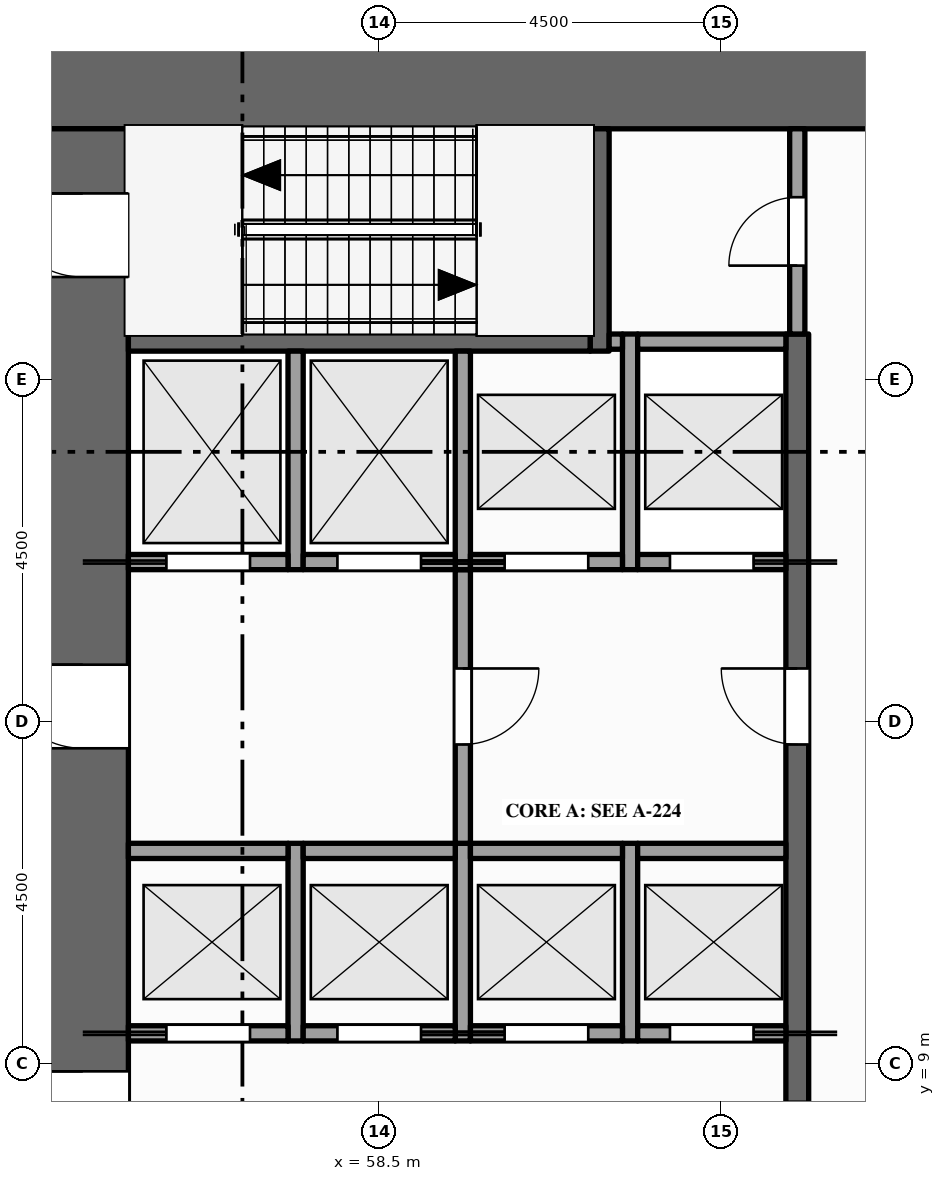
"""IFC4 building model, lengths in metres.
Left out: names, types, materials, properties, quantities, classifications, styles, units other than length and angle.
Written with IfcOpenShell. Run it as: python <this file> out.ifc"""

import sys

from ifc_helpers import new_model, si_unit, direction, frame, frame_2d, origin, place, context, subcontext, project, spatial, rectangle, extrude, element, fill, save


model = new_model("IFC4")
c1 = context("Model", 3, precision=1e-05, world=origin(), true_north=direction((0.0, 1.0)))
c2 = subcontext(c1, "Body", "Model", "MODEL_VIEW")
j1 = project(units=[si_unit("LENGTHUNIT", "METRE"), si_unit("PLANEANGLEUNIT", "RADIAN")], contexts=[c1])
p1 = place(None, origin())
s1 = spatial("IfcSite", under=j1, at=p1, CompositionType="ELEMENT")
p2 = place(p1, origin())
s2 = spatial("IfcBuilding", under=s1, at=p2, CompositionType="ELEMENT")
p3 = place(p2, frame((0.0, 0.0, 131.0)))
s3 = spatial("IfcBuildingStorey", under=s2, at=p3, CompositionType="ELEMENT", Elevation=131.0)
p4 = place(p3, frame((54.0, 21.9, -0.15), z_axis=(0.0, 0.0, 1.0), x_axis=(1.0, 0.0, 0.0)))
e1 = element("IfcWall", 1, at=p4, inside=s3, PredefinedType="SHEAR", context=c2, shape_type="SweptSolid", body=[
    extrude(rectangle(XDim=13.5, YDim=1.2, at=frame_2d((6.75, 0.0))), origin(), (0.0, 0.0, 1.0), 8.0),
])
p5 = place(p3, frame((54.6, 1.2, -0.15), z_axis=(0.0, 0.0, 1.0), x_axis=(0.0, 1.0, 0.0)))
e2 = element("IfcWall", 2, at=p5, inside=s3, PredefinedType="SHEAR", context=c2, shape_type="SweptSolid", body=[
    extrude(rectangle(XDim=20.1, YDim=1.2, at=frame_2d((10.05, 0.0))), origin(), (0.0, 0.0, 1.0), 8.0),
])
p6 = place(p5, frame((5.9, 0.0, 0.15)))
e3 = element("IfcOpeningElement", 3, at=p6, cuts=e2, PredefinedType="OPENING", context=c2, shape_type="SweptSolid", body=[
    extrude(rectangle(XDim=1.8, YDim=2.1, at=frame_2d((0.9, 1.05))), frame((0.0, 0.61, 0.0), z_axis=(0.0, -1.0, 0.0), x_axis=(1.0, 0.0, 0.0)), (0.0, 0.0, 1.0), 1.22),
])
p7 = place(p5, frame((11.95, 0.0, 0.15)))
e4 = element("IfcOpeningElement", 4, at=p7, cuts=e2, PredefinedType="OPENING", context=c2, shape_type="SweptSolid", body=[
    extrude(rectangle(XDim=1.1, YDim=2.1, at=frame_2d((0.55, 1.05))), frame((0.0, 0.61, 0.0), z_axis=(0.0, -1.0, 0.0), x_axis=(1.0, 0.0, 0.0)), (0.0, 0.0, 1.0), 1.22),
])
p8 = place(p5, frame((0.95, 0.0, 0.15)))
e5 = element("IfcOpeningElement", 5, at=p8, cuts=e2, PredefinedType="OPENING", context=c2, shape_type="SweptSolid", body=[
    extrude(rectangle(XDim=1.1, YDim=2.1, at=frame_2d((0.55, 1.05))), frame((0.0, 0.61, 0.0), z_axis=(0.0, -1.0, 0.0), x_axis=(1.0, 0.0, 0.0)), (0.0, 0.0, 1.0), 1.22),
])
p9 = place(p5, frame((18.15, 0.0, 0.15)))
e6 = element("IfcOpeningElement", 6, at=p9, cuts=e2, PredefinedType="OPENING", context=c2, shape_type="SweptSolid", body=[
    extrude(rectangle(XDim=1.1, YDim=2.1, at=frame_2d((0.55, 1.05))), frame((0.0, 0.61, 0.0), z_axis=(0.0, -1.0, 0.0), x_axis=(1.0, 0.0, 0.0)), (0.0, 0.0, 1.0), 1.22),
])
p10 = place(p3, frame((57.4, 9.3, 0.0), z_axis=(0.0, 0.0, 1.0), x_axis=(0.0, 1.0, 0.0)))
e7 = element("IfcWall", 7, at=p10, inside=s3, PredefinedType="SOLIDWALL", context=c2, shape_type="SweptSolid", body=[
    extrude(rectangle(XDim=2.6, YDim=0.2, at=frame_2d((1.3, 0.0))), origin(), (0.0, 0.0, 1.0), 7.85),
])
p11 = place(p3, frame((57.4, 15.5, 0.0), z_axis=(0.0, 0.0, 1.0), x_axis=(0.0, 1.0, 0.0)))
e8 = element("IfcWall", 8, at=p11, inside=s3, PredefinedType="SOLIDWALL", context=c2, shape_type="SweptSolid", body=[
    extrude(rectangle(XDim=2.875, YDim=0.2, at=frame_2d((1.438, 0.0))), origin(), (0.0, 0.0, 1.0), 7.85),
])
p12 = place(p3, frame((59.6, 9.3, 0.0), z_axis=(0.0, 0.0, 1.0), x_axis=(0.0, 1.0, 0.0)))
e9 = element("IfcWall", 9, at=p12, inside=s3, PredefinedType="SOLIDWALL", context=c2, shape_type="SweptSolid", body=[
    extrude(rectangle(XDim=2.6, YDim=0.2, at=frame_2d((1.3, 0.0))), origin(), (0.0, 0.0, 1.0), 7.85),
])
p13 = place(p3, frame((59.6, 11.9, 0.0), z_axis=(0.0, 0.0, 1.0), x_axis=(0.0, 1.0, 0.0)))
e10 = element("IfcWall", 10, at=p13, inside=s3, PredefinedType="PARTITIONING", context=c2, shape_type="SweptSolid", body=[
    extrude(rectangle(XDim=3.6, YDim=0.2, at=frame_2d((1.8, 0.0))), origin(), (0.0, 0.0, 1.0), 7.85),
])
p14 = place(p13, frame((1.3, 0.0, 0.0)))
e11 = element("IfcOpeningElement", 11, at=p14, cuts=e10, PredefinedType="OPENING", context=c2, shape_type="SweptSolid", body=[
    extrude(rectangle(XDim=1.0, YDim=2.1, at=frame_2d((0.5, 1.05))), frame((0.0, 0.11, 0.0), z_axis=(0.0, -1.0, 0.0), x_axis=(1.0, 0.0, 0.0)), (0.0, 0.0, 1.0), 0.22),
])
p15 = place(p3, frame((59.6, 15.5, 0.0), z_axis=(0.0, 0.0, 1.0), x_axis=(0.0, 1.0, 0.0)))
e12 = element("IfcWall", 12, at=p15, inside=s3, PredefinedType="SOLIDWALL", context=c2, shape_type="SweptSolid", body=[
    extrude(rectangle(XDim=2.875, YDim=0.2, at=frame_2d((1.438, 0.0))), origin(), (0.0, 0.0, 1.0), 7.85),
])
p16 = place(p3, frame((61.4, 18.375, 0.0), z_axis=(0.0, 0.0, 1.0), x_axis=(0.0, 1.0, 0.0)))
e13 = element("IfcWall", 13, at=p16, inside=s3, PredefinedType="SHEAR", context=c2, shape_type="SweptSolid", body=[
    extrude(rectangle(XDim=2.925, YDim=0.25, at=frame_2d((1.462, 0.0))), origin(), (0.0, 0.0, 1.0), 7.85),
])
p17 = place(p3, frame((61.8, 9.3, 0.0), z_axis=(0.0, 0.0, 1.0), x_axis=(0.0, 1.0, 0.0)))
e14 = element("IfcWall", 14, at=p17, inside=s3, PredefinedType="SOLIDWALL", context=c2, shape_type="SweptSolid", body=[
    extrude(rectangle(XDim=2.6, YDim=0.2, at=frame_2d((1.3, 0.0))), origin(), (0.0, 0.0, 1.0), 7.85),
])
p18 = place(p3, frame((61.8, 15.5, 0.0), z_axis=(0.0, 0.0, 1.0), x_axis=(0.0, 1.0, 0.0)))
e15 = element("IfcWall", 15, at=p18, inside=s3, PredefinedType="SOLIDWALL", context=c2, shape_type="SweptSolid", body=[
    extrude(rectangle(XDim=3.1, YDim=0.2, at=frame_2d((1.55, 0.0))), origin(), (0.0, 0.0, 1.0), 7.85),
])
p19 = place(p3, frame((64.0, 4.1, 0.0), z_axis=(0.0, 0.0, 1.0), x_axis=(0.0, 1.0, 0.0)))
e16 = element("IfcWall", 16, at=p19, inside=s3, PredefinedType="SHEAR", context=c2, shape_type="SweptSolid", body=[
    extrude(rectangle(XDim=14.5, YDim=0.3, at=frame_2d((7.25, 0.0))), origin(), (0.0, 0.0, 1.0), 7.85),
])
p20 = place(p19, frame((3.4, 0.0, 0.0)))
e17 = element("IfcOpeningElement", 17, at=p20, cuts=e16, PredefinedType="OPENING", context=c2, shape_type="SweptSolid", body=[
    extrude(rectangle(XDim=1.0, YDim=2.1, at=frame_2d((0.5, 1.05))), frame((0.0, 0.16, 0.0), z_axis=(0.0, -1.0, 0.0), x_axis=(1.0, 0.0, 0.0)), (0.0, 0.0, 1.0), 0.32),
])
p21 = place(p19, frame((9.1, 0.0, 0.0)))
e18 = element("IfcOpeningElement", 18, at=p21, cuts=e16, PredefinedType="OPENING", context=c2, shape_type="SweptSolid", body=[
    extrude(rectangle(XDim=1.0, YDim=2.1, at=frame_2d((0.5, 1.05))), frame((0.0, 0.16, 0.0), z_axis=(0.0, -1.0, 0.0), x_axis=(1.0, 0.0, 0.0)), (0.0, 0.0, 1.0), 0.32),
])
p22 = place(p3, frame((64.0, 18.6, 0.0), z_axis=(0.0, 0.0, 1.0), x_axis=(0.0, 1.0, 0.0)))
e19 = element("IfcWall", 19, at=p22, inside=s3, PredefinedType="PARTITIONING", context=c2, shape_type="SweptSolid", body=[
    extrude(rectangle(XDim=2.7, YDim=0.2, at=frame_2d((1.35, 0.0))), origin(), (0.0, 0.0, 1.0), 7.85),
])
p23 = place(p22, frame((0.9, 0.0, 0.0)))
e20 = element("IfcOpeningElement", 20, at=p23, cuts=e19, PredefinedType="OPENING", context=c2, shape_type="SweptSolid", body=[
    extrude(rectangle(XDim=0.9, YDim=2.1, at=frame_2d((0.45, 1.05))), frame((0.0, 0.11, 0.0), z_axis=(0.0, -1.0, 0.0), x_axis=(1.0, 0.0, 0.0)), (0.0, 0.0, 1.0), 0.22),
])
p24 = place(p3, frame((55.2, 9.4, 0.0), z_axis=(0.0, 0.0, 1.0), x_axis=(1.0, 0.0, 0.0)))
e21 = element("IfcWall", 21, at=p24, inside=s3, PredefinedType="SOLIDWALL", context=c2, shape_type="SweptSolid", body=[
    extrude(rectangle(XDim=2.1, YDim=0.2, at=frame_2d((1.05, 0.0))), origin(), (0.0, 0.0, 1.0), 7.85),
])
p25 = place(p24, frame((0.5, 0.0, 0.012)))
e22 = element("IfcOpeningElement", 22, at=p25, cuts=e21, PredefinedType="OPENING", context=c2, shape_type="SweptSolid", body=[
    extrude(rectangle(XDim=1.1, YDim=2.1, at=frame_2d((0.55, 1.05))), frame((0.0, 0.11, 0.0), z_axis=(0.0, -1.0, 0.0), x_axis=(1.0, 0.0, 0.0)), (0.0, 0.0, 1.0), 0.22),
])
p26 = place(p3, frame((57.5, 9.4, 0.0), z_axis=(0.0, 0.0, 1.0), x_axis=(1.0, 0.0, 0.0)))
e23 = element("IfcWall", 23, at=p26, inside=s3, PredefinedType="SOLIDWALL", context=c2, shape_type="SweptSolid", body=[
    extrude(rectangle(XDim=2.0, YDim=0.2, at=frame_2d((1.0, 0.0))), origin(), (0.0, 0.0, 1.0), 7.85),
])
p27 = place(p26, frame((0.45, 0.0, 0.012)))
e24 = element("IfcOpeningElement", 24, at=p27, cuts=e23, PredefinedType="OPENING", context=c2, shape_type="SweptSolid", body=[
    extrude(rectangle(XDim=1.1, YDim=2.1, at=frame_2d((0.55, 1.05))), frame((0.0, 0.11, 0.0), z_axis=(0.0, -1.0, 0.0), x_axis=(1.0, 0.0, 0.0)), (0.0, 0.0, 1.0), 0.22),
])
p28 = place(p3, frame((59.7, 9.4, 0.0), z_axis=(0.0, 0.0, 1.0), x_axis=(1.0, 0.0, 0.0)))
e25 = element("IfcWall", 25, at=p28, inside=s3, PredefinedType="SOLIDWALL", context=c2, shape_type="SweptSolid", body=[
    extrude(rectangle(XDim=2.0, YDim=0.2, at=frame_2d((1.0, 0.0))), origin(), (0.0, 0.0, 1.0), 7.85),
])
p29 = place(p28, frame((0.45, 0.0, 0.012)))
e26 = element("IfcOpeningElement", 26, at=p29, cuts=e25, PredefinedType="OPENING", context=c2, shape_type="SweptSolid", body=[
    extrude(rectangle(XDim=1.1, YDim=2.1, at=frame_2d((0.55, 1.05))), frame((0.0, 0.11, 0.0), z_axis=(0.0, -1.0, 0.0), x_axis=(1.0, 0.0, 0.0)), (0.0, 0.0, 1.0), 0.22),
])
p30 = place(p3, frame((61.9, 9.4, 0.0), z_axis=(0.0, 0.0, 1.0), x_axis=(1.0, 0.0, 0.0)))
e27 = element("IfcWall", 27, at=p30, inside=s3, PredefinedType="SOLIDWALL", context=c2, shape_type="SweptSolid", body=[
    extrude(rectangle(XDim=1.95, YDim=0.2, at=frame_2d((0.975, 0.0))), origin(), (0.0, 0.0, 1.0), 7.85),
])
p31 = place(p30, frame((0.425, 0.0, 0.012)))
e28 = element("IfcOpeningElement", 28, at=p31, cuts=e27, PredefinedType="OPENING", context=c2, shape_type="SweptSolid", body=[
    extrude(rectangle(XDim=1.1, YDim=2.1, at=frame_2d((0.55, 1.05))), frame((0.0, 0.11, 0.0), z_axis=(0.0, -1.0, 0.0), x_axis=(1.0, 0.0, 0.0)), (0.0, 0.0, 1.0), 0.22),
])
p32 = place(p3, frame((55.2, 11.8, 0.0), z_axis=(0.0, 0.0, 1.0), x_axis=(1.0, 0.0, 0.0)))
e29 = element("IfcWall", 29, at=p32, inside=s3, PredefinedType="SOLIDWALL", context=c2, shape_type="SweptSolid", body=[
    extrude(rectangle(XDim=2.1, YDim=0.2, at=frame_2d((1.05, 0.0))), origin(), (0.0, 0.0, 1.0), 7.85),
])
for number, where, z_axis, x_axis in (
    (30, (57.5, 11.8, 0.0), (0.0, 0.0, 1.0), (1.0, 0.0, 0.0)),
    (31, (59.7, 11.8, 0.0), (0.0, 0.0, 1.0), (1.0, 0.0, 0.0)),
):
    element("IfcWall", number, at=place(p3, frame(where, z_axis=z_axis, x_axis=x_axis)), inside=s3, PredefinedType="SOLIDWALL", context=c2, shape_type="SweptSolid", body=[
        extrude(rectangle(XDim=2.0, YDim=0.2, at=frame_2d((1.0, 0.0))), origin(), (0.0, 0.0, 1.0), 7.85),
    ])
p33 = place(p3, frame((61.9, 11.8, 0.0), z_axis=(0.0, 0.0, 1.0), x_axis=(1.0, 0.0, 0.0)))
e32 = element("IfcWall", 32, at=p33, inside=s3, PredefinedType="SOLIDWALL", context=c2, shape_type="SweptSolid", body=[
    extrude(rectangle(XDim=1.95, YDim=0.2, at=frame_2d((0.975, 0.0))), origin(), (0.0, 0.0, 1.0), 7.85),
])
p34 = place(p3, frame((55.2, 15.6, 0.0), z_axis=(0.0, 0.0, 1.0), x_axis=(1.0, 0.0, 0.0)))
e33 = element("IfcWall", 33, at=p34, inside=s3, PredefinedType="SOLIDWALL", context=c2, shape_type="SweptSolid", body=[
    extrude(rectangle(XDim=2.1, YDim=0.2, at=frame_2d((1.05, 0.0))), origin(), (0.0, 0.0, 1.0), 7.85),
])
p35 = place(p34, frame((0.5, 0.0, 0.012)))
e34 = element("IfcOpeningElement", 34, at=p35, cuts=e33, PredefinedType="OPENING", context=c2, shape_type="SweptSolid", body=[
    extrude(rectangle(XDim=1.1, YDim=2.1, at=frame_2d((0.55, 1.05))), frame((0.0, 0.11, 0.0), z_axis=(0.0, -1.0, 0.0), x_axis=(1.0, 0.0, 0.0)), (0.0, 0.0, 1.0), 0.22),
])
p36 = place(p3, frame((57.5, 15.6, 0.0), z_axis=(0.0, 0.0, 1.0), x_axis=(1.0, 0.0, 0.0)))
e35 = element("IfcWall", 35, at=p36, inside=s3, PredefinedType="SOLIDWALL", context=c2, shape_type="SweptSolid", body=[
    extrude(rectangle(XDim=2.0, YDim=0.2, at=frame_2d((1.0, 0.0))), origin(), (0.0, 0.0, 1.0), 7.85),
])
p37 = place(p36, frame((0.45, 0.0, 0.012)))
e36 = element("IfcOpeningElement", 36, at=p37, cuts=e35, PredefinedType="OPENING", context=c2, shape_type="SweptSolid", body=[
    extrude(rectangle(XDim=1.1, YDim=2.1, at=frame_2d((0.55, 1.05))), frame((0.0, 0.11, 0.0), z_axis=(0.0, -1.0, 0.0), x_axis=(1.0, 0.0, 0.0)), (0.0, 0.0, 1.0), 0.22),
])
p38 = place(p3, frame((59.7, 15.6, 0.0), z_axis=(0.0, 0.0, 1.0), x_axis=(1.0, 0.0, 0.0)))
e37 = element("IfcWall", 37, at=p38, inside=s3, PredefinedType="SOLIDWALL", context=c2, shape_type="SweptSolid", body=[
    extrude(rectangle(XDim=2.0, YDim=0.2, at=frame_2d((1.0, 0.0))), origin(), (0.0, 0.0, 1.0), 7.85),
])
p39 = place(p38, frame((0.45, 0.0, 0.012)))
e38 = element("IfcOpeningElement", 38, at=p39, cuts=e37, PredefinedType="OPENING", context=c2, shape_type="SweptSolid", body=[
    extrude(rectangle(XDim=1.1, YDim=2.1, at=frame_2d((0.55, 1.05))), frame((0.0, 0.11, 0.0), z_axis=(0.0, -1.0, 0.0), x_axis=(1.0, 0.0, 0.0)), (0.0, 0.0, 1.0), 0.22),
])
p40 = place(p3, frame((61.9, 15.6, 0.0), z_axis=(0.0, 0.0, 1.0), x_axis=(1.0, 0.0, 0.0)))
e39 = element("IfcWall", 39, at=p40, inside=s3, PredefinedType="SOLIDWALL", context=c2, shape_type="SweptSolid", body=[
    extrude(rectangle(XDim=1.95, YDim=0.2, at=frame_2d((0.975, 0.0))), origin(), (0.0, 0.0, 1.0), 7.85),
])
p41 = place(p40, frame((0.425, 0.0, 0.012)))
e40 = element("IfcOpeningElement", 40, at=p41, cuts=e39, PredefinedType="OPENING", context=c2, shape_type="SweptSolid", body=[
    extrude(rectangle(XDim=1.1, YDim=2.1, at=frame_2d((0.55, 1.05))), frame((0.0, 0.11, 0.0), z_axis=(0.0, -1.0, 0.0), x_axis=(1.0, 0.0, 0.0)), (0.0, 0.0, 1.0), 0.22),
])
p42 = place(p3, frame((55.2, 18.5, 0.0), z_axis=(0.0, 0.0, 1.0), x_axis=(1.0, 0.0, 0.0)))
e41 = element("IfcWall", 41, at=p42, inside=s3, PredefinedType="SHEAR", context=c2, shape_type="SweptSolid", body=[
    extrude(rectangle(XDim=6.075, YDim=0.25, at=frame_2d((3.038, 0.0))), origin(), (0.0, 0.0, 1.0), 7.85),
])
p43 = place(p3, frame((61.525, 18.5, 0.0), z_axis=(0.0, 0.0, 1.0), x_axis=(1.0, 0.0, 0.0)))
e42 = element("IfcWall", 42, at=p43, inside=s3, PredefinedType="SOLIDWALL", context=c2, shape_type="SweptSolid", body=[
    extrude(rectangle(XDim=0.175, YDim=0.2, at=frame_2d((0.087, 0.0))), origin(), (0.0, 0.0, 1.0), 7.85),
])
p44 = place(p3, frame((61.9, 18.5, 0.0), z_axis=(0.0, 0.0, 1.0), x_axis=(1.0, 0.0, 0.0)))
e43 = element("IfcWall", 43, at=p44, inside=s3, PredefinedType="SOLIDWALL", context=c2, shape_type="SweptSolid", body=[
    extrude(rectangle(XDim=1.95, YDim=0.2, at=frame_2d((0.975, 0.0))), origin(), (0.0, 0.0, 1.0), 7.85),
])
p45 = place(p25, origin())
e44 = element("IfcDoor", 44, at=p45, inside=s3, OperationType="SLIDING_TO_LEFT", PredefinedType="DOOR", context=c2, shape_type="SweptSolid", body=[
    extrude(rectangle(XDim=1.1, YDim=2.1, at=frame_2d((0.55, 1.05))), frame((0.0, 0.025, 0.0), z_axis=(0.0, -1.0, 0.0), x_axis=(1.0, 0.0, 0.0)), (0.0, 0.0, 1.0), 0.05),
])
fill(e22, e44)
p46 = place(p27, origin())
e45 = element("IfcDoor", 45, at=p46, inside=s3, OperationType="SLIDING_TO_RIGHT", PredefinedType="DOOR", context=c2, shape_type="SweptSolid", body=[
    extrude(rectangle(XDim=1.1, YDim=2.1, at=frame_2d((0.55, 1.05))), frame((0.0, 0.025, 0.0), z_axis=(0.0, -1.0, 0.0), x_axis=(1.0, 0.0, 0.0)), (0.0, 0.0, 1.0), 0.05),
])
fill(e24, e45)
p47 = place(p29, origin())
e46 = element("IfcDoor", 46, at=p47, inside=s3, OperationType="SLIDING_TO_LEFT", PredefinedType="DOOR", context=c2, shape_type="SweptSolid", body=[
    extrude(rectangle(XDim=1.1, YDim=2.1, at=frame_2d((0.55, 1.05))), frame((0.0, 0.025, 0.0), z_axis=(0.0, -1.0, 0.0), x_axis=(1.0, 0.0, 0.0)), (0.0, 0.0, 1.0), 0.05),
])
fill(e26, e46)
p48 = place(p31, origin())
e47 = element("IfcDoor", 47, at=p48, inside=s3, OperationType="SLIDING_TO_RIGHT", PredefinedType="DOOR", context=c2, shape_type="SweptSolid", body=[
    extrude(rectangle(XDim=1.1, YDim=2.1, at=frame_2d((0.55, 1.05))), frame((0.0, 0.025, 0.0), z_axis=(0.0, -1.0, 0.0), x_axis=(1.0, 0.0, 0.0)), (0.0, 0.0, 1.0), 0.05),
])
fill(e28, e47)
p49 = place(p35, origin())
e48 = element("IfcDoor", 48, at=p49, inside=s3, OperationType="SLIDING_TO_LEFT", PredefinedType="DOOR", context=c2, shape_type="SweptSolid", body=[
    extrude(rectangle(XDim=1.1, YDim=2.1, at=frame_2d((0.55, 1.05))), frame((0.0, 0.025, 0.0), z_axis=(0.0, -1.0, 0.0), x_axis=(1.0, 0.0, 0.0)), (0.0, 0.0, 1.0), 0.05),
])
fill(e34, e48)
p50 = place(p37, origin())
e49 = element("IfcDoor", 49, at=p50, inside=s3, OperationType="SLIDING_TO_RIGHT", PredefinedType="DOOR", context=c2, shape_type="SweptSolid", body=[
    extrude(rectangle(XDim=1.1, YDim=2.1, at=frame_2d((0.55, 1.05))), frame((0.0, 0.025, 0.0), z_axis=(0.0, -1.0, 0.0), x_axis=(1.0, 0.0, 0.0)), (0.0, 0.0, 1.0), 0.05),
])
fill(e36, e49)
p51 = place(p39, origin())
e50 = element("IfcDoor", 50, at=p51, inside=s3, OperationType="SLIDING_TO_LEFT", PredefinedType="DOOR", context=c2, shape_type="SweptSolid", body=[
    extrude(rectangle(XDim=1.1, YDim=2.1, at=frame_2d((0.55, 1.05))), frame((0.0, 0.025, 0.0), z_axis=(0.0, -1.0, 0.0), x_axis=(1.0, 0.0, 0.0)), (0.0, 0.0, 1.0), 0.05),
])
fill(e38, e50)
p52 = place(p41, origin())
e51 = element("IfcDoor", 51, at=p52, inside=s3, OperationType="SLIDING_TO_RIGHT", PredefinedType="DOOR", context=c2, shape_type="SweptSolid", body=[
    extrude(rectangle(XDim=1.1, YDim=2.1, at=frame_2d((0.55, 1.05))), frame((0.0, 0.025, 0.0), z_axis=(0.0, -1.0, 0.0), x_axis=(1.0, 0.0, 0.0)), (0.0, 0.0, 1.0), 0.05),
])
fill(e40, e51)
p53 = place(p6, origin())
e52 = element("IfcDoor", 52, at=p53, inside=s3, OperationType="DOUBLE_DOOR_SINGLE_SWING", PredefinedType="DOOR", context=c2, shape_type="SweptSolid", body=[
    extrude(rectangle(XDim=1.8, YDim=2.1, at=frame_2d((0.9, 1.05))), frame((0.0, 0.025, 0.0), z_axis=(0.0, -1.0, 0.0), x_axis=(1.0, 0.0, 0.0)), (0.0, 0.0, 1.0), 0.05),
])
fill(e3, e52)
p54 = place(p7, origin())
e53 = element("IfcDoor", 53, at=p54, inside=s3, OperationType="SINGLE_SWING_RIGHT", PredefinedType="DOOR", context=c2, shape_type="SweptSolid", body=[
    extrude(rectangle(XDim=1.1, YDim=2.1, at=frame_2d((0.55, 1.05))), frame((0.0, 0.025, 0.0), z_axis=(0.0, -1.0, 0.0), x_axis=(1.0, 0.0, 0.0)), (0.0, 0.0, 1.0), 0.05),
])
fill(e4, e53)
p55 = place(p14, origin())
e54 = element("IfcDoor", 54, at=p55, inside=s3, OperationType="SINGLE_SWING_RIGHT", PredefinedType="DOOR", context=c2, shape_type="SweptSolid", body=[
    extrude(rectangle(XDim=1.0, YDim=2.1, at=frame_2d((0.5, 1.05))), frame((0.0, 0.025, 0.0), z_axis=(0.0, -1.0, 0.0), x_axis=(1.0, 0.0, 0.0)), (0.0, 0.0, 1.0), 0.05),
])
fill(e11, e54)
p56 = place(p21, origin())
e55 = element("IfcDoor", 55, at=p56, inside=s3, OperationType="SINGLE_SWING_RIGHT", PredefinedType="DOOR", context=c2, shape_type="SweptSolid", body=[
    extrude(rectangle(XDim=1.0, YDim=2.1, at=frame_2d((0.5, 1.05))), frame((0.0, 0.025, 0.0), z_axis=(0.0, -1.0, 0.0), x_axis=(1.0, 0.0, 0.0)), (0.0, 0.0, 1.0), 0.05),
])
fill(e18, e55)
p57 = place(p9, origin())
e56 = element("IfcDoor", 56, at=p57, inside=s3, OperationType="SINGLE_SWING_RIGHT", PredefinedType="DOOR", context=c2, shape_type="SweptSolid", body=[
    extrude(rectangle(XDim=1.1, YDim=2.1, at=frame_2d((0.55, 1.05))), frame((0.0, 0.025, 0.0), z_axis=(0.0, -1.0, 0.0), x_axis=(1.0, 0.0, 0.0)), (0.0, 0.0, 1.0), 0.05),
])
fill(e6, e56)
p58 = place(p23, origin())
e57 = element("IfcDoor", 57, at=p58, inside=s3, OperationType="SINGLE_SWING_LEFT", PredefinedType="DOOR", context=c2, shape_type="SweptSolid", body=[
    extrude(rectangle(XDim=0.9, YDim=2.1, at=frame_2d((0.45, 1.05))), frame((0.0, 0.025, 0.0), z_axis=(0.0, -1.0, 0.0), x_axis=(1.0, 0.0, 0.0)), (0.0, 0.0, 1.0), 0.05),
])
fill(e20, e57)
save(model, sys.argv[1])
